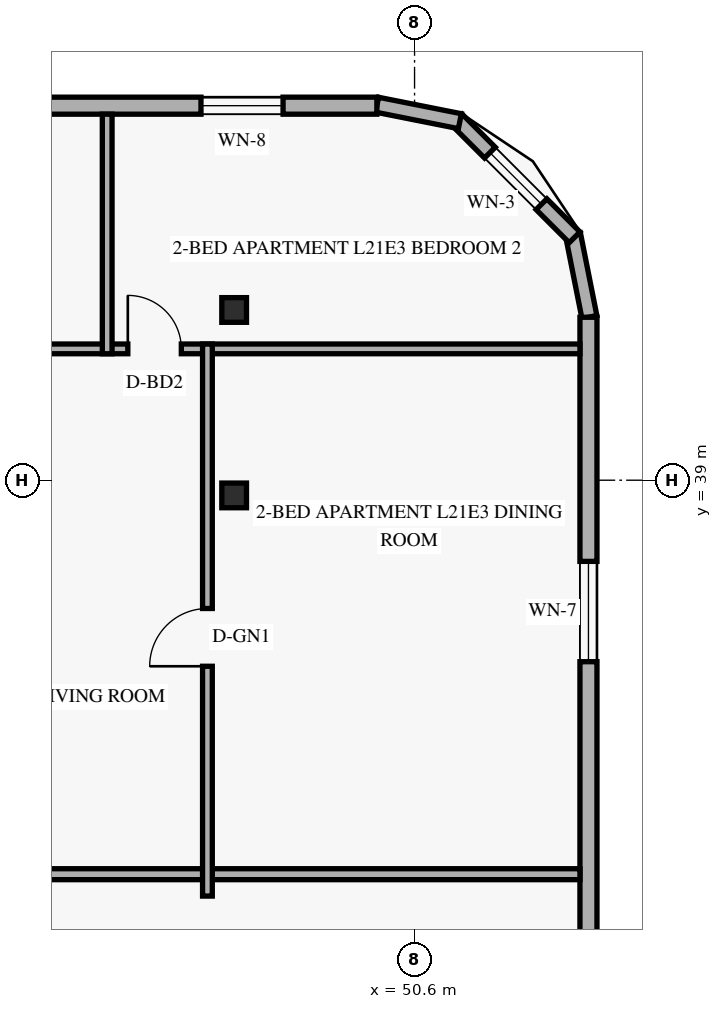
"""IFC4 building model, lengths in metres.
Left out: names, types, materials, properties, quantities, classifications, styles, units other than length and angle.
Written with IfcOpenShell. Run it as: python <this file> out.ifc"""

import sys

from ifc_helpers import new_model, si_unit, direction, frame, frame_2d, origin, origin_2d, place, context, subcontext, project, spatial, rectangle, hollow_rectangle, extrude, element, fill, save


model = new_model("IFC4")
c1 = context("Model", 3, precision=1e-05, world=origin(), true_north=direction((0.0, 1.0)))
c2 = subcontext(c1, "Body", "Model", "MODEL_VIEW")
j1 = project(units=[si_unit("LENGTHUNIT", "METRE"), si_unit("PLANEANGLEUNIT", "RADIAN")], contexts=[c1])
p1 = place(None, origin())
s1 = spatial("IfcSite", under=j1, at=p1, CompositionType="ELEMENT")
p2 = place(p1, origin())
s2 = spatial("IfcBuilding", under=s1, at=p2, CompositionType="ELEMENT")
p3 = place(p2, frame((0.0, 0.0, 84.0)))
s3 = spatial("IfcBuildingStorey", under=s2, at=p3, CompositionType="ELEMENT", Elevation=84.0)
for number, where, z_axis, x_axis in (
    (1, (47.529, 38.75, 0.0), (0.058, 0.0, 0.998), (0.0, 1.0, 0.0)),
    (2, (47.529, 41.8, 0.0), (0.058, 0.0, 0.998), (0.0, 1.0, 0.0)),
):
    element("IfcColumn", number, at=place(p3, frame(where, z_axis=z_axis, x_axis=x_axis)), inside=s3, PredefinedType="COLUMN", context=c2, shape_type="SweptSolid", body=[
        extrude(hollow_rectangle(XDim=0.406, YDim=0.406, WallThickness=0.016, at=origin_2d()), origin(), (0.0, 0.0, 1.0), 3.606),
    ])
p4 = place(p3, frame((53.476, 41.684, 0.0), z_axis=(0.0, 0.0, 1.0), x_axis=(-0.195000137217, 0.980803214965, 0.0)))
e3 = element("IfcWall", 3, at=p4, inside=s3, PredefinedType="SOLIDWALL", context=c2, shape_type="SweptSolid", body=[
    extrude(rectangle(XDim=1.388, YDim=0.25, at=frame_2d((0.694, 0.0))), origin(), (0.0, 0.0, 1.0), 3.36),
])
p5 = place(p3, frame((53.232, 42.995, 0.0), z_axis=(0.0, 0.0, 1.0), x_axis=(-0.707151344399, 0.707062215165, 0.0)))
e4 = element("IfcWall", 4, at=p5, inside=s3, PredefinedType="SOLIDWALL", context=c2, shape_type="SweptSolid", body=[
    extrude(rectangle(XDim=2.739, YDim=0.25, at=frame_2d((1.37, 0.0))), origin(), (0.0, 0.0, 1.0), 3.36),
])
p6 = place(p5, frame((0.77, 0.0, 0.85)))
e5 = element("IfcOpeningElement", 5, at=p6, cuts=e4, PredefinedType="OPENING", context=c2, shape_type="SweptSolid", body=[
    extrude(rectangle(XDim=1.2, YDim=1.5, at=frame_2d((0.6, 0.75))), frame((0.0, 0.135, 0.0), z_axis=(0.0, -1.0, 0.0), x_axis=(1.0, 0.0, 0.0)), (0.0, 0.0, 1.0), 0.27),
])
p7 = place(p3, frame((51.345, 44.905, 0.0), z_axis=(0.0, 0.0, 1.0), x_axis=(-0.980809899341, 0.19496651342, 0.0)))
e6 = element("IfcWall", 6, at=p7, inside=s3, PredefinedType="SOLIDWALL", context=c2, shape_type="SweptSolid", body=[
    extrude(rectangle(XDim=1.389, YDim=0.25, at=frame_2d((0.694, 0.0))), origin(), (0.0, 0.0, 1.0), 3.36),
])
p8 = place(p3, frame((53.46, 6.32, 0.0), z_axis=(0.0, 0.0, 1.0), x_axis=(0.0, 1.0, 0.0)))
e7 = element("IfcWall", 7, at=p8, inside=s3, PredefinedType="SOLIDWALL", context=c2, shape_type="SweptSolid", body=[
    extrude(rectangle(XDim=35.36, YDim=0.28, at=frame_2d((17.68, 0.0))), origin(), (0.0, 0.0, 1.0), 3.36),
])
p9 = place(p8, frame((4.82, 0.0, 0.85)))
e8 = element("IfcOpeningElement", 8, at=p9, cuts=e7, PredefinedType="OPENING", context=c2, shape_type="SweptSolid", body=[
    extrude(rectangle(XDim=1.65, YDim=1.6, at=frame_2d((0.825, 0.8))), frame((0.0, 0.15, 0.0), z_axis=(0.0, -1.0, 0.0), x_axis=(1.0, 0.0, 0.0)), (0.0, 0.0, 1.0), 0.3),
])
p10 = place(p8, frame((15.675, 0.0, 0.85)))
e9 = element("IfcOpeningElement", 9, at=p10, cuts=e7, PredefinedType="OPENING", context=c2, shape_type="SweptSolid", body=[
    extrude(rectangle(XDim=1.65, YDim=1.6, at=frame_2d((0.825, 0.8))), frame((0.0, 0.15, 0.0), z_axis=(0.0, -1.0, 0.0), x_axis=(1.0, 0.0, 0.0)), (0.0, 0.0, 1.0), 0.3),
])
p11 = place(p8, frame((23.13, 0.0, 0.85)))
e10 = element("IfcOpeningElement", 10, at=p11, cuts=e7, PredefinedType="OPENING", context=c2, shape_type="SweptSolid", body=[
    extrude(rectangle(XDim=1.65, YDim=1.6, at=frame_2d((0.825, 0.8))), frame((0.0, 0.15, 0.0), z_axis=(0.0, -1.0, 0.0), x_axis=(1.0, 0.0, 0.0)), (0.0, 0.0, 1.0), 0.3),
])
p12 = place(p8, frame((29.695, 0.0, 0.85)))
e11 = element("IfcOpeningElement", 11, at=p12, cuts=e7, PredefinedType="OPENING", context=c2, shape_type="SweptSolid", body=[
    extrude(rectangle(XDim=1.65, YDim=1.6, at=frame_2d((0.825, 0.8))), frame((0.0, 0.15, 0.0), z_axis=(0.0, -1.0, 0.0), x_axis=(1.0, 0.0, 0.0)), (0.0, 0.0, 1.0), 0.3),
])
p13 = place(p3, frame((49.98, 45.16, 0.0), z_axis=(0.0, 0.0, 1.0), x_axis=(-1.0, 0.0, 0.0)))
e12 = element("IfcWall", 12, at=p13, inside=s3, PredefinedType="SOLIDWALL", context=c2, shape_type="SweptSolid", body=[
    extrude(rectangle(XDim=36.56, YDim=0.28, at=frame_2d((18.28, 0.0))), origin(), (0.0, 0.0, 1.0), 3.36),
])
p14 = place(p13, frame((31.14, 0.0, 0.85)))
e13 = element("IfcOpeningElement", 13, at=p14, cuts=e12, PredefinedType="OPENING", context=c2, shape_type="SweptSolid", body=[
    extrude(rectangle(XDim=1.35, YDim=1.55, at=frame_2d((0.675, 0.775))), frame((0.0, 0.15, 0.0), z_axis=(0.0, -1.0, 0.0), x_axis=(1.0, 0.0, 0.0)), (0.0, 0.0, 1.0), 0.3),
])
p15 = place(p13, frame((26.605, 0.0, 0.85)))
e14 = element("IfcOpeningElement", 14, at=p15, cuts=e12, PredefinedType="OPENING", context=c2, shape_type="SweptSolid", body=[
    extrude(rectangle(XDim=1.35, YDim=1.55, at=frame_2d((0.675, 0.775))), frame((0.0, 0.15, 0.0), z_axis=(0.0, -1.0, 0.0), x_axis=(1.0, 0.0, 0.0)), (0.0, 0.0, 1.0), 0.3),
])
p16 = place(p13, frame((22.754, 0.0, 0.85)))
e15 = element("IfcOpeningElement", 15, at=p16, cuts=e12, PredefinedType="OPENING", context=c2, shape_type="SweptSolid", body=[
    extrude(rectangle(XDim=1.35, YDim=1.55, at=frame_2d((0.675, 0.775))), frame((0.0, 0.15, 0.0), z_axis=(0.0, -1.0, 0.0), x_axis=(1.0, 0.0, 0.0)), (0.0, 0.0, 1.0), 0.3),
])
p17 = place(p13, frame((16.919, 0.0, 0.85)))
e16 = element("IfcOpeningElement", 16, at=p17, cuts=e12, PredefinedType="OPENING", context=c2, shape_type="SweptSolid", body=[
    extrude(rectangle(XDim=1.35, YDim=1.55, at=frame_2d((0.675, 0.775))), frame((0.0, 0.15, 0.0), z_axis=(0.0, -1.0, 0.0), x_axis=(1.0, 0.0, 0.0)), (0.0, 0.0, 1.0), 0.3),
])
p18 = place(p13, frame((12.82, 0.0, 0.85)))
e17 = element("IfcOpeningElement", 17, at=p18, cuts=e12, PredefinedType="OPENING", context=c2, shape_type="SweptSolid", body=[
    extrude(rectangle(XDim=1.35, YDim=1.55, at=frame_2d((0.675, 0.775))), frame((0.0, 0.15, 0.0), z_axis=(0.0, -1.0, 0.0), x_axis=(1.0, 0.0, 0.0)), (0.0, 0.0, 1.0), 0.3),
])
p19 = place(p13, frame((7.758, 0.0, 0.85)))
e18 = element("IfcOpeningElement", 18, at=p19, cuts=e12, PredefinedType="OPENING", context=c2, shape_type="SweptSolid", body=[
    extrude(rectangle(XDim=1.35, YDim=1.55, at=frame_2d((0.675, 0.775))), frame((0.0, 0.15, 0.0), z_axis=(0.0, -1.0, 0.0), x_axis=(1.0, 0.0, 0.0)), (0.0, 0.0, 1.0), 0.3),
])
p20 = place(p13, frame((1.542, 0.0, 0.85)))
e19 = element("IfcOpeningElement", 19, at=p20, cuts=e12, PredefinedType="OPENING", context=c2, shape_type="SweptSolid", body=[
    extrude(rectangle(XDim=1.35, YDim=1.55, at=frame_2d((0.675, 0.775))), frame((0.0, 0.15, 0.0), z_axis=(0.0, -1.0, 0.0), x_axis=(1.0, 0.0, 0.0)), (0.0, 0.0, 1.0), 0.3),
])
p21 = place(p3, frame((37.64, 32.52, 0.0), z_axis=(0.0, 0.0, 1.0), x_axis=(1.0, 0.0, 0.0)))
e20 = element("IfcWall", 20, at=p21, inside=s3, PredefinedType="PARTITIONING", context=c2, shape_type="SweptSolid", body=[
    extrude(rectangle(XDim=15.68, YDim=0.18, at=frame_2d((7.84, 0.0))), origin(), (0.0, 0.0, 1.0), 2.731),
])
p22 = place(p3, frame((37.64, 41.16, 0.0), z_axis=(0.0, 0.0, 1.0), x_axis=(1.0, 0.0, 0.0)))
e21 = element("IfcWall", 21, at=p22, inside=s3, PredefinedType="PARTITIONING", context=c2, shape_type="SweptSolid", body=[
    extrude(rectangle(XDim=15.68, YDim=0.16, at=frame_2d((7.84, 0.0))), origin(), (0.0, 0.0, 1.0), 2.731),
])
p23 = place(p22, frame((5.892, 0.0, 0.0)))
e22 = element("IfcOpeningElement", 22, at=p23, cuts=e21, PredefinedType="OPENING", context=c2, shape_type="SweptSolid", body=[
    extrude(rectangle(XDim=0.88, YDim=2.14, at=frame_2d((0.44, 1.07))), frame((0.0, 0.09, 0.0), z_axis=(0.0, -1.0, 0.0), x_axis=(1.0, 0.0, 0.0)), (0.0, 0.0, 1.0), 0.18),
])
p24 = place(p22, frame((8.244, 0.0, 0.0)))
e23 = element("IfcOpeningElement", 23, at=p24, cuts=e21, PredefinedType="OPENING", context=c2, shape_type="SweptSolid", body=[
    extrude(rectangle(XDim=0.88, YDim=2.14, at=frame_2d((0.44, 1.07))), frame((0.0, 0.09, 0.0), z_axis=(0.0, -1.0, 0.0), x_axis=(1.0, 0.0, 0.0)), (0.0, 0.0, 1.0), 0.18),
])
p25 = place(p3, frame((47.194, 32.16, 0.0), z_axis=(0.0, 0.0, 1.0), x_axis=(0.0, 1.0, 0.0)))
e24 = element("IfcWall", 24, at=p25, inside=s3, PredefinedType="PARTITIONING", context=c2, shape_type="SweptSolid", body=[
    extrude(rectangle(XDim=9.08, YDim=0.16, at=frame_2d((4.54, 0.0))), origin(), (0.0, 0.0, 1.0), 2.731),
])
p26 = place(p25, frame((3.78, 0.0, 0.0)))
e25 = element("IfcOpeningElement", 25, at=p26, cuts=e24, PredefinedType="OPENING", context=c2, shape_type="SweptSolid", body=[
    extrude(rectangle(XDim=0.95, YDim=2.15, at=frame_2d((0.475, 1.075))), frame((0.0, 0.09, 0.0), z_axis=(0.0, -1.0, 0.0), x_axis=(1.0, 0.0, 0.0)), (0.0, 0.0, 1.0), 0.18),
])
p27 = place(p3, frame((45.545, 41.08, 0.0), z_axis=(0.0, 0.0, 1.0), x_axis=(0.0, 1.0, 0.0)))
e26 = element("IfcWall", 26, at=p27, inside=s3, PredefinedType="PARTITIONING", context=c2, shape_type="SweptSolid", body=[
    extrude(rectangle(XDim=3.94, YDim=0.16, at=frame_2d((1.97, 0.0))), origin(), (0.0, 0.0, 1.0), 2.809),
])
p28 = place(p6, origin())
e27 = element("IfcWindow", 27, at=p28, inside=s3, PartitioningType="SINGLE_PANEL", PredefinedType="WINDOW", context=c2, shape_type="SweptSolid", body=[
    extrude(rectangle(XDim=1.2, YDim=1.5, at=frame_2d((0.6, 0.75))), frame((0.0, 0.03, 0.0), z_axis=(0.0, -1.0, 0.0), x_axis=(1.0, 0.0, 0.0)), (0.0, 0.0, 1.0), 0.06),
])
fill(e5, e27)
p29 = place(p12, origin())
e28 = element("IfcWindow", 28, at=p29, inside=s3, PartitioningType="SINGLE_PANEL", PredefinedType="WINDOW", context=c2, shape_type="SweptSolid", body=[
    extrude(rectangle(XDim=1.65, YDim=1.6, at=frame_2d((0.825, 0.8))), frame((0.0, 0.03, 0.0), z_axis=(0.0, -1.0, 0.0), x_axis=(1.0, 0.0, 0.0)), (0.0, 0.0, 1.0), 0.06),
])
fill(e11, e28)
p30 = place(p20, origin())
e29 = element("IfcWindow", 29, at=p30, inside=s3, PartitioningType="SINGLE_PANEL", PredefinedType="WINDOW", context=c2, shape_type="SweptSolid", body=[
    extrude(rectangle(XDim=1.35, YDim=1.55, at=frame_2d((0.675, 0.775))), frame((0.0, 0.03, 0.0), z_axis=(0.0, -1.0, 0.0), x_axis=(1.0, 0.0, 0.0)), (0.0, 0.0, 1.0), 0.06),
])
fill(e19, e29)
p31 = place(p26, origin())
e30 = element("IfcDoor", 30, at=p31, inside=s3, OperationType="SINGLE_SWING_LEFT", PredefinedType="DOOR", context=c2, shape_type="SweptSolid", body=[
    extrude(rectangle(XDim=0.95, YDim=2.15, at=frame_2d((0.475, 1.075))), frame((0.0, 0.025, 0.0), z_axis=(0.0, -1.0, 0.0), x_axis=(1.0, 0.0, 0.0)), (0.0, 0.0, 1.0), 0.05),
])
fill(e25, e30)
p32 = place(p24, origin())
e31 = element("IfcDoor", 31, at=p32, inside=s3, OperationType="SINGLE_SWING_LEFT", PredefinedType="DOOR", context=c2, shape_type="SweptSolid", body=[
    extrude(rectangle(XDim=0.88, YDim=2.14, at=frame_2d((0.44, 1.07))), frame((0.0, 0.025, 0.0), z_axis=(0.0, -1.0, 0.0), x_axis=(1.0, 0.0, 0.0)), (0.0, 0.0, 1.0), 0.05),
])
fill(e23, e31)
save(model, sys.argv[1])
